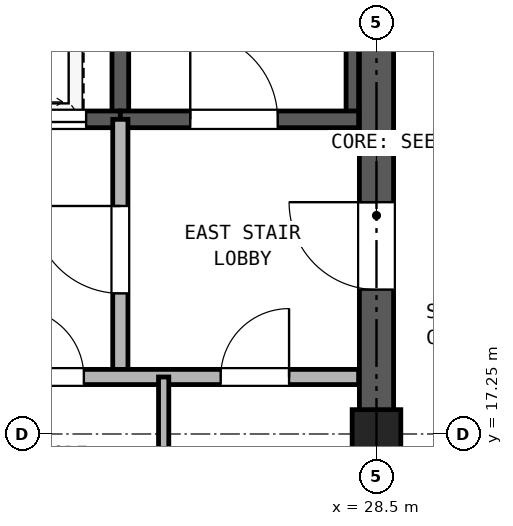
"""IFC4 building model, lengths in metres.
Left out: names, types, materials, properties, quantities, classifications, styles, units other than length and angle.
Written with IfcOpenShell. Run it as: python <this file> out.ifc"""

import sys

from ifc_helpers import new_model, si_unit, direction, frame, frame_2d, origin, origin_2d, place, context, subcontext, project, spatial, rectangle, hollow_rectangle, extrude, source, transform, mapped, element, fill, save


model = new_model("IFC4")
c1 = context("Model", 3, precision=1e-05, world=origin(), true_north=direction((0.0, 1.0)))
c2 = subcontext(c1, "Body", "Model", "MODEL_VIEW")
j1 = project(units=[si_unit("LENGTHUNIT", "METRE"), si_unit("PLANEANGLEUNIT", "RADIAN")], contexts=[c1])
p1 = place(None, origin())
s1 = spatial("IfcSite", under=j1, at=p1, CompositionType="ELEMENT")
p2 = place(p1, origin())
s2 = spatial("IfcBuilding", under=s1, at=p2, CompositionType="ELEMENT")
p3 = place(p2, frame((0.0, 0.0, 151.6)))
s3 = spatial("IfcBuildingStorey", under=s2, at=p3, CompositionType="ELEMENT", Elevation=151.6)
m1 = source(origin(), c2, "Body", "SweptSolid", [
    extrude(hollow_rectangle(XDim=0.64, YDim=0.64, WallThickness=0.035, at=origin_2d()), origin(), (0.0, 0.0, 1.0), 4.25),
])
p4 = place(p3, frame((28.5, 17.25, 0.0), z_axis=(0.0, 0.0, 1.0), x_axis=(1.0, 0.0, 0.0)))
e1 = element("IfcColumn", 1, at=p4, inside=s3, PredefinedType="COLUMN", context=c2, shape_type="MappedRepresentation", body=[
    mapped(m1, transform((0.0, 0.0, 0.0), x_axis=(1.0, 0.0, 0.0), y_axis=(0.0, 1.0, 0.0), z_axis=(0.0, 0.0, 1.0), scale=1.0)),
])
p5 = place(p3, frame((28.5, 11.725, 0.0), z_axis=(0.0, 0.0, 1.0), x_axis=(0.0, 1.0, 0.0)))
e2 = element("IfcWall", 2, at=p5, inside=s3, PredefinedType="SHEAR", context=c2, shape_type="SweptSolid", body=[
    extrude(rectangle(XDim=16.8, YDim=0.45, at=frame_2d((8.4, 0.0))), origin(), (0.0, 0.0, 1.0), 4.25),
])
p6 = place(p5, frame((7.425, 0.0, 0.0)))
e3 = element("IfcOpeningElement", 3, at=p6, cuts=e2, PredefinedType="OPENING", context=c2, shape_type="SweptSolid", body=[
    extrude(rectangle(XDim=1.15, YDim=2.2, at=frame_2d((0.575, 1.1))), frame((0.0, 0.235, 0.0), z_axis=(0.0, -1.0, 0.0), x_axis=(1.0, 0.0, 0.0)), (0.0, 0.0, 1.0), 0.47),
])
p7 = place(p3, frame((25.13, 21.39, 0.0), z_axis=(0.0, 0.0, 1.0), x_axis=(0.0, 1.0, 0.0)))
e4 = element("IfcWall", 4, at=p7, inside=s3, PredefinedType="SOLIDWALL", context=c2, shape_type="SweptSolid", body=[
    extrude(rectangle(XDim=7.11, YDim=0.22, at=frame_2d((3.555, 0.0))), origin(), (0.0, 0.0, 1.0), 4.25),
])
p8 = place(p3, frame((28.183, 21.39, 0.0), z_axis=(0.0, 0.0, 1.0), x_axis=(0.0, 1.0, 0.0)))
e5 = element("IfcWall", 5, at=p8, inside=s3, PredefinedType="PARTITIONING", context=c2, shape_type="SweptSolid", body=[
    extrude(rectangle(XDim=6.945, YDim=0.165, at=frame_2d((3.473, 0.0))), origin(), (0.0, 0.0, 1.0), 4.25),
])
p9 = place(p3, frame((18.735, 21.39, 0.0), z_axis=(0.0, 0.0, 1.0), x_axis=(1.0, 0.0, 0.0)))
e6 = element("IfcWall", 6, at=p9, inside=s3, PredefinedType="SOLIDWALL", context=c2, shape_type="SweptSolid", body=[
    extrude(rectangle(XDim=6.395, YDim=0.22, at=frame_2d((3.197, 0.0))), origin(), (0.0, 0.0, 1.0), 4.25),
])
p10 = place(p9, frame((1.115, 0.0, 0.0)))
e7 = element("IfcOpeningElement", 7, at=p10, cuts=e6, PredefinedType="OPENING", context=c2, shape_type="SweptSolid", body=[
    extrude(rectangle(XDim=1.15, YDim=2.2, at=frame_2d((0.575, 1.1))), frame((0.0, 0.12, 0.0), z_axis=(0.0, -1.0, 0.0), x_axis=(1.0, 0.0, 0.0)), (0.0, 0.0, 1.0), 0.24),
])
p11 = place(p9, frame((4.845, 0.0, 0.0)))
e8 = element("IfcOpeningElement", 8, at=p11, cuts=e6, PredefinedType="OPENING", context=c2, shape_type="SweptSolid", body=[
    extrude(rectangle(XDim=1.1, YDim=2.25, at=frame_2d((0.55, 1.125))), frame((0.0, 0.12, 0.0), z_axis=(0.0, -1.0, 0.0), x_axis=(1.0, 0.0, 0.0)), (0.0, 0.0, 1.0), 0.24),
])
p12 = place(p3, frame((25.13, 21.39, 0.0), z_axis=(0.0, 0.0, 1.0), x_axis=(1.0, 0.0, 0.0)))
e9 = element("IfcWall", 9, at=p12, inside=s3, PredefinedType="SOLIDWALL", context=c2, shape_type="SweptSolid", body=[
    extrude(rectangle(XDim=3.135, YDim=0.22, at=frame_2d((1.567, 0.0))), origin(), (0.0, 0.0, 1.0), 4.25),
])
p13 = place(p12, frame((0.92, 0.0, 0.0)))
e10 = element("IfcOpeningElement", 10, at=p13, cuts=e9, PredefinedType="OPENING", context=c2, shape_type="SweptSolid", body=[
    extrude(rectangle(XDim=1.15, YDim=2.2, at=frame_2d((0.575, 1.1))), frame((0.0, 0.12, 0.0), z_axis=(0.0, -1.0, 0.0), x_axis=(1.0, 0.0, 0.0)), (0.0, 0.0, 1.0), 0.24),
])
p14 = place(p3, frame((25.13, 18.0, 0.0), z_axis=(0.0, 0.0, 1.0), x_axis=(0.0, 1.0, 0.0)))
e11 = element("IfcWall", 11, at=p14, inside=s3, PredefinedType="PARTITIONING", context=c2, shape_type="SweptSolid", body=[
    extrude(rectangle(XDim=3.39, YDim=0.2, at=frame_2d((1.695, 0.0))), origin(), (0.0, 0.0, 1.0), 4.25),
])
p15 = place(p14, frame((1.1, 0.0, 0.0)))
e12 = element("IfcOpeningElement", 12, at=p15, cuts=e11, PredefinedType="OPENING", context=c2, shape_type="SweptSolid", body=[
    extrude(rectangle(XDim=1.15, YDim=2.2, at=frame_2d((0.575, 1.1))), frame((0.0, 0.11, 0.0), z_axis=(0.0, -1.0, 0.0), x_axis=(1.0, 0.0, 0.0)), (0.0, 0.0, 1.0), 0.22),
])
p16 = place(p3, frame((18.735, 18.0, 0.0), z_axis=(0.0, 0.0, 1.0), x_axis=(1.0, 0.0, 0.0)))
e13 = element("IfcWall", 13, at=p16, inside=s3, PredefinedType="PARTITIONING", context=c2, shape_type="SweptSolid", body=[
    extrude(rectangle(XDim=9.53, YDim=0.2, at=frame_2d((4.765, 0.0))), origin(), (0.0, 0.0, 1.0), 4.25),
])
p17 = place(p16, frame((0.515, 0.0, 0.0)))
e14 = element("IfcOpeningElement", 14, at=p17, cuts=e13, PredefinedType="OPENING", context=c2, shape_type="SweptSolid", body=[
    extrude(rectangle(XDim=1.3, YDim=2.3, at=frame_2d((0.65, 1.15))), frame((0.0, 0.11, 0.0), z_axis=(0.0, -1.0, 0.0), x_axis=(1.0, 0.0, 0.0)), (0.0, 0.0, 1.0), 0.22),
])
p18 = place(p16, frame((2.615, 0.0, 0.0)))
e15 = element("IfcOpeningElement", 15, at=p18, cuts=e13, PredefinedType="OPENING", context=c2, shape_type="SweptSolid", body=[
    extrude(rectangle(XDim=1.3, YDim=2.3, at=frame_2d((0.65, 1.15))), frame((0.0, 0.11, 0.0), z_axis=(0.0, -1.0, 0.0), x_axis=(1.0, 0.0, 0.0)), (0.0, 0.0, 1.0), 0.22),
])
p19 = place(p16, frame((5.015, 0.0, 0.0)))
e16 = element("IfcOpeningElement", 16, at=p19, cuts=e13, PredefinedType="OPENING", context=c2, shape_type="SweptSolid", body=[
    extrude(rectangle(XDim=0.9, YDim=2.05, at=frame_2d((0.45, 1.025))), frame((0.0, 0.11, 0.0), z_axis=(0.0, -1.0, 0.0), x_axis=(1.0, 0.0, 0.0)), (0.0, 0.0, 1.0), 0.22),
])
p20 = place(p16, frame((7.715, 0.0, 0.0)))
e17 = element("IfcOpeningElement", 17, at=p20, cuts=e13, PredefinedType="OPENING", context=c2, shape_type="SweptSolid", body=[
    extrude(rectangle(XDim=0.9, YDim=2.05, at=frame_2d((0.45, 1.025))), frame((0.0, 0.11, 0.0), z_axis=(0.0, -1.0, 0.0), x_axis=(1.0, 0.0, 0.0)), (0.0, 0.0, 1.0), 0.22),
])
p21 = place(p3, frame((25.7, 15.0, 0.0), z_axis=(0.0, 0.0, 1.0), x_axis=(0.0, 1.0, 0.0)))
e18 = element("IfcWall", 18, at=p21, inside=s3, PredefinedType="PARTITIONING", context=c2, shape_type="SweptSolid", body=[
    extrude(rectangle(XDim=3.0, YDim=0.135, at=frame_2d((1.5, 0.0))), origin(), (0.0, 0.0, 1.0), 4.25),
])
p22 = place(p13, frame((1.15, 0.0, 0.0), z_axis=(0.0, 0.0, 1.0), x_axis=(-1.0, 0.0, 0.0)))
e19 = element("IfcDoor", 19, at=p22, inside=s3, OperationType="SINGLE_SWING_LEFT", PredefinedType="DOOR", context=c2, shape_type="SweptSolid", body=[
    extrude(rectangle(XDim=1.15, YDim=2.2, at=frame_2d((0.575, 1.1))), frame((0.0, 0.025, 0.0), z_axis=(0.0, -1.0, 0.0), x_axis=(1.0, 0.0, 0.0)), (0.0, 0.0, 1.0), 0.05),
])
fill(e10, e19)
p23 = place(p11, frame((1.1, 0.0, 0.0), z_axis=(0.0, 0.0, 1.0), x_axis=(-1.0, 0.0, 0.0)))
e20 = element("IfcDoor", 20, at=p23, inside=s3, OperationType="DOUBLE_DOOR_SLIDING", PredefinedType="DOOR", context=c2, shape_type="SweptSolid", body=[
    extrude(rectangle(XDim=1.1, YDim=2.25, at=frame_2d((0.55, 1.125))), frame((0.0, 0.025, 0.0), z_axis=(0.0, -1.0, 0.0), x_axis=(1.0, 0.0, 0.0)), (0.0, 0.0, 1.0), 0.05),
])
fill(e8, e20)
p24 = place(p15, origin())
e21 = element("IfcDoor", 21, at=p24, inside=s3, OperationType="SINGLE_SWING_RIGHT", PredefinedType="DOOR", context=c2, shape_type="SweptSolid", body=[
    extrude(rectangle(XDim=1.15, YDim=2.2, at=frame_2d((0.575, 1.1))), frame((0.0, 0.025, 0.0), z_axis=(0.0, -1.0, 0.0), x_axis=(1.0, 0.0, 0.0)), (0.0, 0.0, 1.0), 0.05),
])
fill(e12, e21)
p25 = place(p19, frame((0.9, 0.0, 0.0), z_axis=(0.0, 0.0, 1.0), x_axis=(-1.0, 0.0, 0.0)))
e22 = element("IfcDoor", 22, at=p25, inside=s3, OperationType="SINGLE_SWING_LEFT", PredefinedType="DOOR", context=c2, shape_type="SweptSolid", body=[
    extrude(rectangle(XDim=0.9, YDim=2.05, at=frame_2d((0.45, 1.025))), frame((0.0, 0.025, 0.0), z_axis=(0.0, -1.0, 0.0), x_axis=(1.0, 0.0, 0.0)), (0.0, 0.0, 1.0), 0.05),
])
fill(e16, e22)
p26 = place(p20, frame((0.9, 0.0, 0.0), z_axis=(0.0, 0.0, 1.0), x_axis=(-1.0, 0.0, 0.0)))
e23 = element("IfcDoor", 23, at=p26, inside=s3, OperationType="SINGLE_SWING_RIGHT", PredefinedType="DOOR", context=c2, shape_type="SweptSolid", body=[
    extrude(rectangle(XDim=0.9, YDim=2.05, at=frame_2d((0.45, 1.025))), frame((0.0, 0.025, 0.0), z_axis=(0.0, -1.0, 0.0), x_axis=(1.0, 0.0, 0.0)), (0.0, 0.0, 1.0), 0.05),
])
fill(e17, e23)
p27 = place(p6, origin())
e24 = element("IfcDoor", 24, at=p27, inside=s3, OperationType="SINGLE_SWING_RIGHT", PredefinedType="DOOR", context=c2, shape_type="SweptSolid", body=[
    extrude(rectangle(XDim=1.15, YDim=2.2, at=frame_2d((0.575, 1.1))), frame((0.0, 0.025, 0.0), z_axis=(0.0, -1.0, 0.0), x_axis=(1.0, 0.0, 0.0)), (0.0, 0.0, 1.0), 0.05),
])
fill(e3, e24)
save(model, sys.argv[1])
